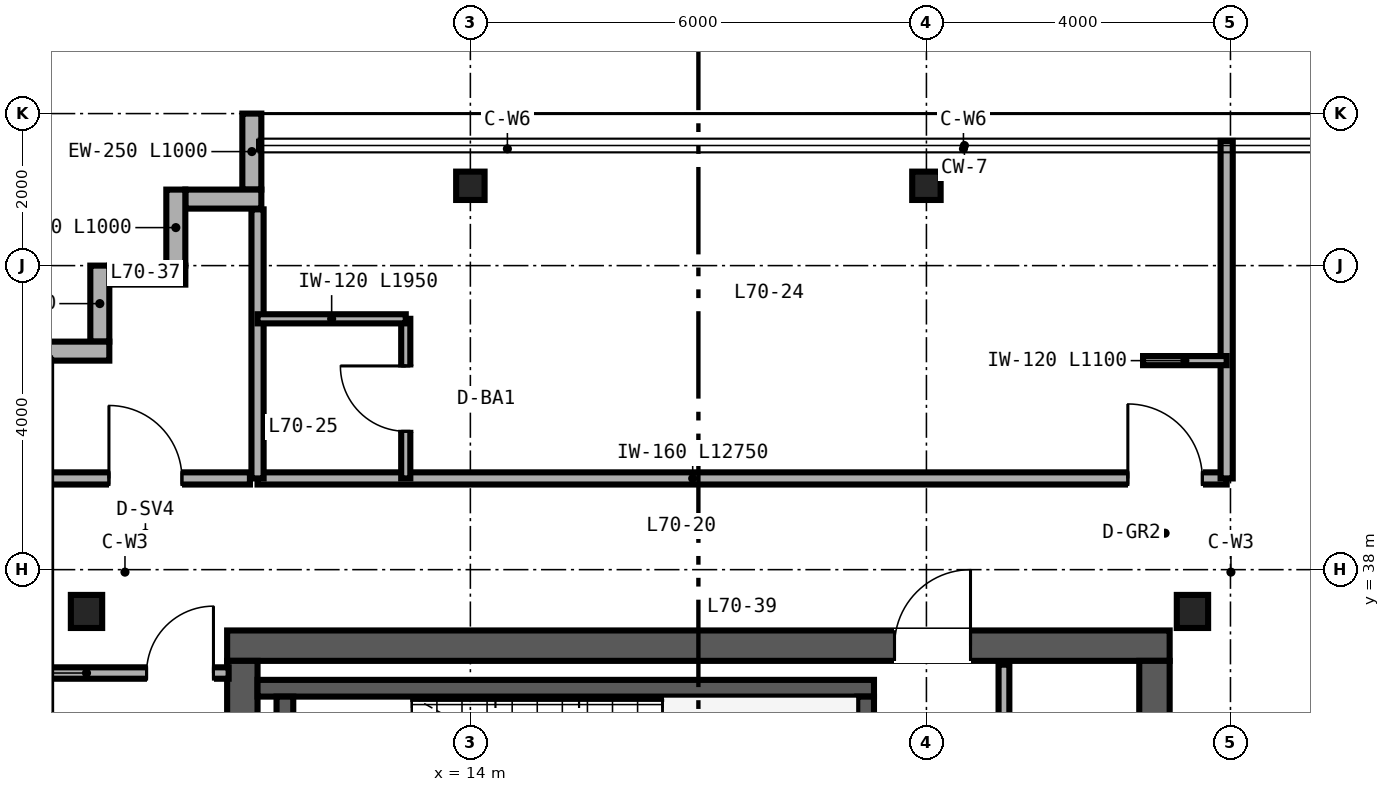
"""IFC4 building model, lengths in metres.
Left out: names, types, materials, properties, quantities, classifications, styles, units other than length and angle.
Written with IfcOpenShell. Run it as: python <this file> out.ifc"""

import sys

from ifc_helpers import new_model, si_unit, direction, frame, frame_2d, origin, origin_2d, place, context, subcontext, project, spatial, rectangle, i_section, extrude, source, transform, mapped, element, fill, save


model = new_model("IFC4")
c1 = context("Model", 3, precision=1e-05, world=origin(), true_north=direction((0.0, 1.0)))
c2 = subcontext(c1, "Body", "Model", "MODEL_VIEW")
j1 = project(units=[si_unit("LENGTHUNIT", "METRE"), si_unit("PLANEANGLEUNIT", "RADIAN")], contexts=[c1])
p1 = place(None, origin())
s1 = spatial("IfcSite", under=j1, at=p1, CompositionType="ELEMENT")
p2 = place(p1, origin())
s2 = spatial("IfcBuilding", under=s1, at=p2, CompositionType="ELEMENT")
p3 = place(p2, frame((0.0, 0.0, 276.0)))
s3 = spatial("IfcBuildingStorey", under=s2, at=p3, CompositionType="ELEMENT", Elevation=276.0)
p4 = place(p3, frame((10.8, 37.0, 0.0), z_axis=(0.0, 0.0, 1.0), x_axis=(1.0, 0.0, 0.0)))
e1 = element("IfcWall", 1, at=p4, inside=s3, PredefinedType="SHEAR", context=c2, shape_type="SweptSolid", body=[
    extrude(rectangle(XDim=12.4, YDim=0.4, at=frame_2d((6.2, 0.0))), origin(), (0.0, 0.0, 1.0), 3.38),
])
p5 = place(p4, frame((8.78, 0.0, 0.0)))
e2 = element("IfcOpeningElement", 2, at=p5, cuts=e1, PredefinedType="OPENING", context=c2, shape_type="SweptSolid", body=[
    extrude(rectangle(XDim=1.0, YDim=2.15, at=frame_2d((0.5, 1.075))), frame((0.0, 0.21, 0.0), z_axis=(0.0, -1.0, 0.0), x_axis=(1.0, 0.0, 0.0)), (0.0, 0.0, 1.0), 0.42),
])
for number, where, z_axis, x_axis in (
    (3, (11.0, 15.2, 0.0), (0.0, 0.0, 1.0), (0.0, 1.0, 0.0)),
    (4, (23.0, 15.2, 0.0), (0.0, 0.0, 1.0), (0.0, 1.0, 0.0)),
):
    element("IfcWall", number, at=place(p3, frame(where, z_axis=z_axis, x_axis=x_axis)), inside=s3, PredefinedType="SHEAR", context=c2, shape_type="SweptSolid", body=[
        extrude(rectangle(XDim=21.6, YDim=0.4, at=frame_2d((10.8, 0.0))), origin(), (0.0, 0.0, 1.0), 3.38),
    ])
p6 = place(p3, frame((11.2, 36.44, 0.0), z_axis=(0.0, 0.0, 1.0), x_axis=(1.0, 0.0, 0.0)))
e5 = element("IfcWall", 5, at=p6, inside=s3, PredefinedType="SHEAR", context=c2, shape_type="SweptSolid", body=[
    extrude(rectangle(XDim=8.11, YDim=0.22, at=frame_2d((4.055, 0.0))), origin(), (0.0, 0.0, 1.0), 3.4),
])
for number, where, z_axis, x_axis in (
    (6, (11.56, 33.05, 0.0), (0.0, 0.0, 1.0), (0.0, 1.0, 0.0)),
    (7, (19.2, 33.05, 0.0), (0.0, 0.0, 1.0), (0.0, 1.0, 0.0)),
):
    element("IfcWall", number, at=place(p3, frame(where, z_axis=z_axis, x_axis=x_axis)), inside=s3, PredefinedType="SHEAR", context=c2, shape_type="SweptSolid", body=[
        extrude(rectangle(XDim=3.28, YDim=0.22, at=frame_2d((1.64, 0.0))), origin(), (0.0, 0.0, 1.0), 3.4),
    ])
m1 = source(origin(), c2, "Body", "SweptSolid", [
    extrude(i_section(OverallWidth=0.412, OverallDepth=0.435, WebThickness=0.036, FlangeThickness=0.057, FilletRadius=0.025, at=origin_2d()), origin(), (0.0, 0.0, 1.0), 3.38),
])
for number, where, z_axis, x_axis in (
    (8, (8.95, 37.45, 0.0), (0.0, 0.0, 1.0), (1.0, 0.0, 0.0)),
    (9, (23.5, 37.45, 0.0), (0.0, 0.0, 1.0), (1.0, 0.0, 0.0)),
):
    element("IfcColumn", number, at=place(p3, frame(where, z_axis=z_axis, x_axis=x_axis)), inside=s3, PredefinedType="COLUMN", context=c2, shape_type="MappedRepresentation", body=[
        mapped(m1, transform((0.0, 0.0, 0.0), scale=1.0)),
    ])
m2 = source(origin(), c2, "Body", "SweptSolid", [
    extrude(i_section(OverallWidth=0.374, OverallDepth=0.373, WebThickness=0.016, FlangeThickness=0.026, FilletRadius=0.025, at=origin_2d()), origin(), (0.0, 0.0, 1.0), 3.38),
])
for number, where, z_axis, x_axis in (
    (10, (14.0, 43.05, 0.0), (0.0, 0.0, 1.0), (1.0, 0.0, 0.0)),
    (11, (20.0, 43.05, 0.0), (0.0, 0.0, 1.0), (1.0, 0.0, 0.0)),
):
    element("IfcColumn", number, at=place(p3, frame(where, z_axis=z_axis, x_axis=x_axis)), inside=s3, PredefinedType="COLUMN", context=c2, shape_type="MappedRepresentation", body=[
        mapped(m2, transform((0.0, 0.0, 0.0), scale=1.0)),
    ])
for number, where, z_axis, x_axis in (
    (12, (11.125, 44.0, 0.0), (0.0, 0.0, 1.0), (0.0, -1.0, 0.0)),
    (13, (11.25, 42.875, 0.0), (0.0, 0.0, 1.0), (-1.0, 0.0, 0.0)),
    (14, (10.125, 43.0, 0.0), (0.0, 0.0, 1.0), (0.0, -1.0, 0.0)),
    (15, (10.25, 41.875, 0.0), (0.0, 0.0, 1.0), (-1.0, 0.0, 0.0)),
    (16, (9.125, 42.0, 0.0), (0.0, 0.0, 1.0), (0.0, -1.0, 0.0)),
):
    element("IfcWall", number, at=place(p3, frame(where, z_axis=z_axis, x_axis=x_axis)), inside=s3, PredefinedType="SOLIDWALL", context=c2, shape_type="SweptSolid", body=[
        extrude(rectangle(XDim=1.0, YDim=0.25, at=frame_2d((0.5, 0.0))), origin(), (0.0, 0.0, 1.0), 3.38),
    ])
p7 = place(p3, frame((9.25, 40.875, 0.0), z_axis=(0.0, 0.0, 1.0), x_axis=(-1.0, 0.0, 0.0)))
e17 = element("IfcWall", 17, at=p7, inside=s3, PredefinedType="SOLIDWALL", context=c2, shape_type="SweptSolid", body=[
    extrude(rectangle(XDim=1.25, YDim=0.25, at=frame_2d((0.625, 0.0))), origin(), (0.0, 0.0, 1.0), 3.38),
])
p8 = place(p3, frame((21.02, 33.28, 0.0), z_axis=(0.0, 0.0, 1.0), x_axis=(0.0, 1.0, 0.0)))
e18 = element("IfcWall", 18, at=p8, inside=s3, PredefinedType="PARTITIONING", context=c2, shape_type="SweptSolid", body=[
    extrude(rectangle(XDim=3.47, YDim=0.142, at=frame_2d((1.735, 0.0))), origin(), (0.0, 0.0, 1.0), 3.38),
])
p9 = place(p8, frame((1.15, 0.0, 0.0)))
e19 = element("IfcOpeningElement", 19, at=p9, cuts=e18, PredefinedType="OPENING", context=c2, shape_type="SweptSolid", body=[
    extrude(rectangle(XDim=0.84, YDim=2.1, at=frame_2d((0.42, 1.05))), frame((0.0, 0.081, 0.0), z_axis=(0.0, -1.0, 0.0), x_axis=(1.0, 0.0, 0.0)), (0.0, 0.0, 1.0), 0.162),
])
p10 = place(p3, frame((11.2, 39.2, 0.0), z_axis=(0.0, 0.0, 1.0), x_axis=(1.0, 0.0, 0.0)))
e20 = element("IfcWall", 20, at=p10, inside=s3, PredefinedType="PARTITIONING", context=c2, shape_type="SweptSolid", body=[
    extrude(rectangle(XDim=12.75, YDim=0.16, at=frame_2d((6.375, 0.0))), origin(), (0.0, 0.0, 1.0), 3.38),
])
p11 = place(p10, frame((11.45, 0.0, 0.0)))
e21 = element("IfcOpeningElement", 21, at=p11, cuts=e20, PredefinedType="OPENING", context=c2, shape_type="SweptSolid", body=[
    extrude(rectangle(XDim=0.98, YDim=2.2, at=frame_2d((0.49, 1.1))), frame((0.0, 0.09, 0.0), z_axis=(0.0, -1.0, 0.0), x_axis=(1.0, 0.0, 0.0)), (0.0, 0.0, 1.0), 0.18),
])
p12 = place(p3, frame((11.2, 39.2, 0.0), z_axis=(0.0, 0.0, 1.0), x_axis=(0.0, 1.0, 0.0)))
e22 = element("IfcWall", 22, at=p12, inside=s3, PredefinedType="PARTITIONING", context=c2, shape_type="SweptSolid", body=[
    extrude(rectangle(XDim=3.54, YDim=0.16, at=frame_2d((1.77, 0.0))), origin(), (0.0, 0.0, 1.0), 3.38),
])
p13 = place(p3, frame((23.95, 39.2, 0.0), z_axis=(0.0, 0.0, 1.0), x_axis=(0.0, 1.0, 0.0)))
e23 = element("IfcWall", 23, at=p13, inside=s3, PredefinedType="PARTITIONING", context=c2, shape_type="SweptSolid", body=[
    extrude(rectangle(XDim=4.44, YDim=0.16, at=frame_2d((2.22, 0.0))), origin(), (0.0, 0.0, 1.0), 3.38),
])
p14 = place(p3, frame((13.15, 39.2, 0.0), z_axis=(0.0, 0.0, 1.0), x_axis=(0.0, 1.0, 0.0)))
e24 = element("IfcWall", 24, at=p14, inside=s3, PredefinedType="PARTITIONING", context=c2, shape_type="SweptSolid", body=[
    extrude(rectangle(XDim=2.1, YDim=0.12, at=frame_2d((1.05, 0.0))), origin(), (0.0, 0.0, 1.0), 3.38),
])
p15 = place(p14, frame((0.62, 0.0, 0.0)))
e25 = element("IfcOpeningElement", 25, at=p15, cuts=e24, PredefinedType="OPENING", context=c2, shape_type="SweptSolid", body=[
    extrude(rectangle(XDim=0.86, YDim=2.1, at=frame_2d((0.43, 1.05))), frame((0.0, 0.07, 0.0), z_axis=(0.0, -1.0, 0.0), x_axis=(1.0, 0.0, 0.0)), (0.0, 0.0, 1.0), 0.14),
])
p16 = place(p3, frame((11.2, 41.3, 0.0), z_axis=(0.0, 0.0, 1.0), x_axis=(1.0, 0.0, 0.0)))
e26 = element("IfcWall", 26, at=p16, inside=s3, PredefinedType="PARTITIONING", context=c2, shape_type="SweptSolid", body=[
    extrude(rectangle(XDim=1.95, YDim=0.12, at=frame_2d((0.975, 0.0))), origin(), (0.0, 0.0, 1.0), 3.38),
])
p17 = place(p3, frame((22.85, 40.75, 0.0), z_axis=(0.0, 0.0, 1.0), x_axis=(1.0, 0.0, 0.0)))
e27 = element("IfcWall", 27, at=p17, inside=s3, PredefinedType="PARTITIONING", context=c2, shape_type="SweptSolid", body=[
    extrude(rectangle(XDim=1.1, YDim=0.12, at=frame_2d((0.55, 0.0))), origin(), (0.0, 0.0, 1.0), 3.38),
])
p18 = place(p3, frame((8.16, 36.64, 0.0), z_axis=(0.0, 0.0, 1.0), x_axis=(1.0, 0.0, 0.0)))
e28 = element("IfcWall", 28, at=p18, inside=s3, PredefinedType="PARTITIONING", context=c2, shape_type="SweptSolid", body=[
    extrude(rectangle(XDim=2.66, YDim=0.15, at=frame_2d((1.33, 0.0))), origin(), (0.0, 0.0, 1.0), 2.763),
])
p19 = place(p18, frame((1.58, 0.0, 0.0)))
e29 = element("IfcOpeningElement", 29, at=p19, cuts=e28, PredefinedType="OPENING", context=c2, shape_type="SweptSolid", body=[
    extrude(rectangle(XDim=0.88, YDim=2.15, at=frame_2d((0.44, 1.075))), frame((0.0, 0.085, 0.0), z_axis=(0.0, -1.0, 0.0), x_axis=(1.0, 0.0, 0.0)), (0.0, 0.0, 1.0), 0.17),
])
p20 = place(p3, frame((8.35, 39.2, 0.0), z_axis=(0.0, 0.0, 1.0), x_axis=(1.0, 0.0, 0.0)))
e30 = element("IfcWall", 30, at=p20, inside=s3, PredefinedType="PARTITIONING", context=c2, shape_type="SweptSolid", body=[
    extrude(rectangle(XDim=2.75, YDim=0.16, at=frame_2d((1.375, 0.0))), origin(), (0.0, 0.0, 1.0), 3.38),
])
p21 = place(p20, frame((0.895, 0.0, 0.0)))
e31 = element("IfcOpeningElement", 31, at=p21, cuts=e30, PredefinedType="OPENING", context=c2, shape_type="SweptSolid", body=[
    extrude(rectangle(XDim=0.96, YDim=2.15, at=frame_2d((0.48, 1.075))), frame((0.0, 0.09, 0.0), z_axis=(0.0, -1.0, 0.0), x_axis=(1.0, 0.0, 0.0)), (0.0, 0.0, 1.0), 0.18),
])
m3 = source(origin(), c2, "Body", "SweptSolid", [
    extrude(rectangle(XDim=1.0, YDim=2.15, at=frame_2d((0.5, 1.075))), frame((0.0, 0.025, 0.0), z_axis=(0.0, -1.0, 0.0), x_axis=(1.0, 0.0, 0.0)), (0.0, 0.0, 1.0), 0.05),
])
p22 = place(p5, origin())
e32 = element("IfcDoor", 32, at=p22, inside=s3, OperationType="SINGLE_SWING_RIGHT", PredefinedType="DOOR", context=c2, shape_type="MappedRepresentation", body=[
    mapped(m3, transform((0.0, 0.0, 0.0), scale=1.0)),
])
fill(e2, e32)
m4 = source(origin(), c2, "Body", "SweptSolid", [
    extrude(rectangle(XDim=0.86, YDim=2.1, at=frame_2d((0.43, 1.05))), frame((0.0, 0.025, 0.0), z_axis=(0.0, -1.0, 0.0), x_axis=(1.0, 0.0, 0.0)), (0.0, 0.0, 1.0), 0.05),
])
p23 = place(p15, origin())
e33 = element("IfcDoor", 33, at=p23, inside=s3, OperationType="SINGLE_SWING_RIGHT", PredefinedType="DOOR", context=c2, shape_type="MappedRepresentation", body=[
    mapped(m4, transform((0.0, 0.0, 0.0), scale=1.0)),
])
fill(e25, e33)
m5 = source(origin(), c2, "Body", "SweptSolid", [
    extrude(rectangle(XDim=0.98, YDim=2.2, at=frame_2d((0.49, 1.1))), frame((0.0, 0.025, 0.0), z_axis=(0.0, -1.0, 0.0), x_axis=(1.0, 0.0, 0.0)), (0.0, 0.0, 1.0), 0.05),
])
p24 = place(p11, origin())
e34 = element("IfcDoor", 34, at=p24, inside=s3, OperationType="SINGLE_SWING_LEFT", PredefinedType="DOOR", context=c2, shape_type="MappedRepresentation", body=[
    mapped(m5, transform((0.0, 0.0, 0.0), scale=1.0)),
])
fill(e21, e34)
m6 = source(origin(), c2, "Body", "SweptSolid", [
    extrude(rectangle(XDim=0.88, YDim=2.15, at=frame_2d((0.44, 1.075))), frame((0.0, 0.025, 0.0), z_axis=(0.0, -1.0, 0.0), x_axis=(1.0, 0.0, 0.0)), (0.0, 0.0, 1.0), 0.05),
])
p25 = place(p19, origin())
e35 = element("IfcDoor", 35, at=p25, inside=s3, OperationType="SINGLE_SWING_RIGHT", PredefinedType="DOOR", context=c2, shape_type="MappedRepresentation", body=[
    mapped(m6, transform((0.0, 0.0, 0.0), scale=1.0)),
])
fill(e29, e35)
m7 = source(origin(), c2, "Body", "SweptSolid", [
    extrude(rectangle(XDim=0.96, YDim=2.15, at=frame_2d((0.48, 1.075))), frame((0.0, 0.025, 0.0), z_axis=(0.0, -1.0, 0.0), x_axis=(1.0, 0.0, 0.0)), (0.0, 0.0, 1.0), 0.05),
])
p26 = place(p21, origin())
e36 = element("IfcDoor", 36, at=p26, inside=s3, OperationType="SINGLE_SWING_LEFT", PredefinedType="DOOR", context=c2, shape_type="MappedRepresentation", body=[
    mapped(m7, transform((0.0, 0.0, 0.0), scale=1.0)),
])
fill(e31, e36)
save(model, sys.argv[1])
